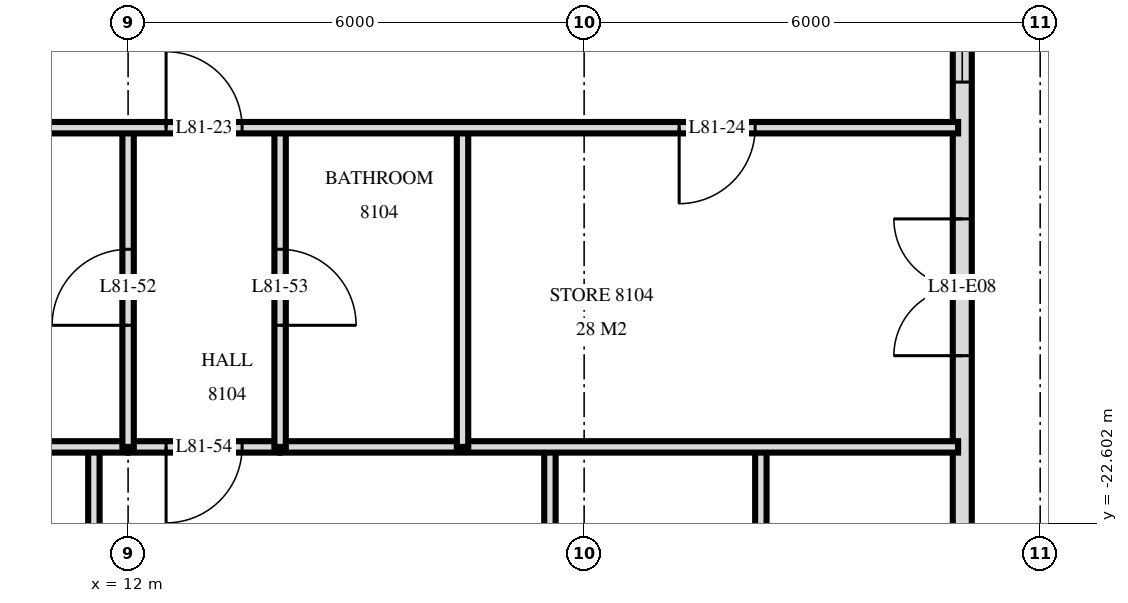
"""IFC4 building model, lengths in metres.
Left out: names, types, materials, properties, quantities, classifications, styles, units other than length and angle.
Written with IfcOpenShell. Run it as: python <this file> out.ifc"""

import sys

from ifc_helpers import new_model, si_unit, direction, frame, frame_2d, origin, place, context, subcontext, project, spatial, rectangle, extrude, element, fill, save


model = new_model("IFC4")
c1 = context("Model", 3, precision=1e-05, world=origin(), true_north=direction((0.0, 1.0)))
c2 = subcontext(c1, "Body", "Model", "MODEL_VIEW")
j1 = project(units=[si_unit("LENGTHUNIT", "METRE"), si_unit("PLANEANGLEUNIT", "RADIAN")], contexts=[c1])
p1 = place(None, origin())
s1 = spatial("IfcSite", under=j1, at=p1, CompositionType="ELEMENT")
p2 = place(p1, origin())
s2 = spatial("IfcBuilding", under=s1, at=p2, CompositionType="ELEMENT")
p3 = place(p2, frame((0.0, 0.0, 305.1)))
s3 = spatial("IfcBuildingStorey", under=s2, at=p3, CompositionType="ELEMENT", Elevation=305.1)
p4 = place(p3, frame((22.975, -29.275, 0.0), z_axis=(0.0, 0.0, 1.0), x_axis=(0.0, 1.0, 0.0)))
e1 = element("IfcWall", 1, at=p4, inside=s3, PredefinedType="SOLIDWALL", context=c2, shape_type="SweptSolid", body=[
    extrude(rectangle(XDim=25.951, YDim=0.25, at=frame_2d((12.975, 0.0))), origin(), (0.0, 0.0, 1.0), 3.2),
])
p5 = place(p4, frame((0.575, 0.0, 0.0)))
e2 = element("IfcOpeningElement", 2, at=p5, cuts=e1, PredefinedType="OPENING", context=c2, shape_type="SweptSolid", body=[
    extrude(rectangle(XDim=1.8, YDim=2.4, at=frame_2d((0.9, 1.2))), frame((0.0, 0.135, 0.0), z_axis=(0.0, -1.0, 0.0), x_axis=(1.0, 0.0, 0.0)), (0.0, 0.0, 1.0), 0.27),
])
p6 = place(p4, frame((3.325, 0.0, 0.9)))
e3 = element("IfcOpeningElement", 3, at=p6, cuts=e1, PredefinedType="OPENING", context=c2, shape_type="SweptSolid", body=[
    extrude(rectangle(XDim=1.8, YDim=1.5, at=frame_2d((0.9, 0.75))), frame((0.0, 0.135, 0.0), z_axis=(0.0, -1.0, 0.0), x_axis=(1.0, 0.0, 0.0)), (0.0, 0.0, 1.0), 0.27),
])
p7 = place(p4, frame((8.875, 0.0, 0.0)))
e4 = element("IfcOpeningElement", 4, at=p7, cuts=e1, PredefinedType="OPENING", context=c2, shape_type="SweptSolid", body=[
    extrude(rectangle(XDim=1.8, YDim=2.4, at=frame_2d((0.9, 1.2))), frame((0.0, 0.135, 0.0), z_axis=(0.0, -1.0, 0.0), x_axis=(1.0, 0.0, 0.0)), (0.0, 0.0, 1.0), 0.27),
])
p8 = place(p4, frame((12.475, 0.0, 0.9)))
e5 = element("IfcOpeningElement", 5, at=p8, cuts=e1, PredefinedType="OPENING", context=c2, shape_type="SweptSolid", body=[
    extrude(rectangle(XDim=1.2, YDim=1.5, at=frame_2d((0.6, 0.75))), frame((0.0, 0.135, 0.0), z_axis=(0.0, -1.0, 0.0), x_axis=(1.0, 0.0, 0.0)), (0.0, 0.0, 1.0), 0.27),
])
p9 = place(p4, frame((16.175, 0.0, 0.0)))
e6 = element("IfcOpeningElement", 6, at=p9, cuts=e1, PredefinedType="OPENING", context=c2, shape_type="SweptSolid", body=[
    extrude(rectangle(XDim=1.8, YDim=2.4, at=frame_2d((0.9, 1.2))), frame((0.0, 0.135, 0.0), z_axis=(0.0, -1.0, 0.0), x_axis=(1.0, 0.0, 0.0)), (0.0, 0.0, 1.0), 0.27),
])
p10 = place(p4, frame((22.425, 0.0, 0.0)))
e7 = element("IfcOpeningElement", 7, at=p10, cuts=e1, PredefinedType="OPENING", context=c2, shape_type="SweptSolid", body=[
    extrude(rectangle(XDim=1.8, YDim=2.4, at=frame_2d((0.9, 1.2))), frame((0.0, 0.135, 0.0), z_axis=(0.0, -1.0, 0.0), x_axis=(1.0, 0.0, 0.0)), (0.0, 0.0, 1.0), 0.27),
])
p11 = place(p3, frame((20.325, -33.239, 0.0), z_axis=(0.0, 0.0, 1.0), x_axis=(0.0, 1.0, 0.0)))
e8 = element("IfcWall", 8, at=p11, inside=s3, PredefinedType="PARTITIONING", context=c2, shape_type="SweptSolid", body=[
    extrude(rectangle(XDim=11.639, YDim=0.15, at=frame_2d((5.819, 0.0))), origin(), (0.0, 0.0, 1.0), 3.22),
])
p12 = place(p11, frame((5.269, 0.0, 0.0)))
e9 = element("IfcOpeningElement", 9, at=p12, cuts=e8, PredefinedType="OPENING", context=c2, shape_type="SweptSolid", body=[
    extrude(rectangle(XDim=0.9, YDim=2.1, at=frame_2d((0.45, 1.05))), frame((0.0, 0.085, 0.0), z_axis=(0.0, -1.0, 0.0), x_axis=(1.0, 0.0, 0.0)), (0.0, 0.0, 1.0), 0.17),
])
p13 = place(p3, frame((17.55, -33.62, 0.0), z_axis=(0.0, 0.0, 1.0), x_axis=(0.0, 1.0, 0.0)))
e10 = element("IfcWall", 10, at=p13, inside=s3, PredefinedType="PARTITIONING", context=c2, shape_type="SweptSolid", body=[
    extrude(rectangle(XDim=12.02, YDim=0.15, at=frame_2d((6.01, 0.0))), origin(), (0.0, 0.0, 1.0), 3.22),
])
p14 = place(p13, frame((5.45, 0.0, 0.0)))
e11 = element("IfcOpeningElement", 11, at=p14, cuts=e10, PredefinedType="OPENING", context=c2, shape_type="SweptSolid", body=[
    extrude(rectangle(XDim=0.9, YDim=2.1, at=frame_2d((0.45, 1.05))), frame((0.0, 0.085, 0.0), z_axis=(0.0, -1.0, 0.0), x_axis=(1.0, 0.0, 0.0)), (0.0, 0.0, 1.0), 0.17),
])
p15 = place(p3, frame((16.4, -21.6, 0.0), z_axis=(0.0, 0.0, 1.0), x_axis=(0.0, 1.0, 0.0)))
e12 = element("IfcWall", 12, at=p15, inside=s3, PredefinedType="PARTITIONING", context=c2, shape_type="SweptSolid", body=[
    extrude(rectangle(XDim=4.2, YDim=0.15, at=frame_2d((2.1, 0.0))), origin(), (0.0, 0.0, 1.0), 3.22),
])
p16 = place(p3, frame((14.0, -21.6, 0.0), z_axis=(0.0, 0.0, 1.0), x_axis=(0.0, 1.0, 0.0)))
e13 = element("IfcWall", 13, at=p16, inside=s3, PredefinedType="PARTITIONING", context=c2, shape_type="SweptSolid", body=[
    extrude(rectangle(XDim=4.2, YDim=0.15, at=frame_2d((2.1, 0.0))), origin(), (0.0, 0.0, 1.0), 3.22),
])
p17 = place(p16, frame((1.6, 0.0, 0.0)))
e14 = element("IfcOpeningElement", 14, at=p17, cuts=e13, PredefinedType="OPENING", context=c2, shape_type="SweptSolid", body=[
    extrude(rectangle(XDim=1.0, YDim=2.1, at=frame_2d((0.5, 1.05))), frame((0.0, 0.085, 0.0), z_axis=(0.0, -1.0, 0.0), x_axis=(1.0, 0.0, 0.0)), (0.0, 0.0, 1.0), 0.17),
])
p18 = place(p3, frame((12.0, -21.6, 0.0), z_axis=(0.0, 0.0, 1.0), x_axis=(0.0, 1.0, 0.0)))
e15 = element("IfcWall", 15, at=p18, inside=s3, PredefinedType="PARTITIONING", context=c2, shape_type="SweptSolid", body=[
    extrude(rectangle(XDim=4.2, YDim=0.15, at=frame_2d((2.1, 0.0))), origin(), (0.0, 0.0, 1.0), 3.22),
])
p19 = place(p18, frame((1.6, 0.0, 0.0)))
e16 = element("IfcOpeningElement", 16, at=p19, cuts=e15, PredefinedType="OPENING", context=c2, shape_type="SweptSolid", body=[
    extrude(rectangle(XDim=1.0, YDim=2.1, at=frame_2d((0.5, 1.05))), frame((0.0, 0.085, 0.0), z_axis=(0.0, -1.0, 0.0), x_axis=(1.0, 0.0, 0.0)), (0.0, 0.0, 1.0), 0.17),
])
p20 = place(p3, frame((11.55, -33.62, 0.0), z_axis=(0.0, 0.0, 1.0), x_axis=(0.0, 1.0, 0.0)))
e17 = element("IfcWall", 17, at=p20, inside=s3, PredefinedType="PARTITIONING", context=c2, shape_type="SweptSolid", body=[
    extrude(rectangle(XDim=12.02, YDim=0.15, at=frame_2d((6.01, 0.0))), origin(), (0.0, 0.0, 1.0), 3.22),
])
p21 = place(p20, frame((5.49, 0.0, 0.0)))
e18 = element("IfcOpeningElement", 18, at=p21, cuts=e17, PredefinedType="OPENING", context=c2, shape_type="SweptSolid", body=[
    extrude(rectangle(XDim=0.9, YDim=2.1, at=frame_2d((0.45, 1.05))), frame((0.0, 0.085, 0.0), z_axis=(0.0, -1.0, 0.0), x_axis=(1.0, 0.0, 0.0)), (0.0, 0.0, 1.0), 0.17),
])
p22 = place(p3, frame((12.0, -21.6, 0.0), z_axis=(0.0, 0.0, 1.0), x_axis=(1.0, 0.0, 0.0)))
e19 = element("IfcWall", 19, at=p22, inside=s3, PredefinedType="PARTITIONING", context=c2, shape_type="SweptSolid", body=[
    extrude(rectangle(XDim=2.0, YDim=0.15, at=frame_2d((1.0, 0.0))), origin(), (0.0, 0.0, 1.0), 3.22),
])
p23 = place(p22, frame((0.5, 0.0, 0.0)))
e20 = element("IfcOpeningElement", 20, at=p23, cuts=e19, PredefinedType="OPENING", context=c2, shape_type="SweptSolid", body=[
    extrude(rectangle(XDim=1.0, YDim=2.1, at=frame_2d((0.5, 1.05))), frame((0.0, 0.085, 0.0), z_axis=(0.0, -1.0, 0.0), x_axis=(1.0, 0.0, 0.0)), (0.0, 0.0, 1.0), 0.17),
])
p24 = place(p3, frame((6.0, -21.6, 0.0), z_axis=(0.0, 0.0, 1.0), x_axis=(1.0, 0.0, 0.0)))
e21 = element("IfcWall", 21, at=p24, inside=s3, PredefinedType="PARTITIONING", context=c2, shape_type="SweptSolid", body=[
    extrude(rectangle(XDim=6.0, YDim=0.15, at=frame_2d((3.0, 0.0))), origin(), (0.0, 0.0, 1.0), 3.22),
])
p25 = place(p24, frame((0.8, 0.0, 0.0)))
e22 = element("IfcOpeningElement", 22, at=p25, cuts=e21, PredefinedType="OPENING", context=c2, shape_type="SweptSolid", body=[
    extrude(rectangle(XDim=0.8, YDim=2.1, at=frame_2d((0.4, 1.05))), frame((0.0, 0.085, 0.0), z_axis=(0.0, -1.0, 0.0), x_axis=(1.0, 0.0, 0.0)), (0.0, 0.0, 1.0), 0.17),
])
p26 = place(p3, frame((14.0, -21.6, 0.0), z_axis=(0.0, 0.0, 1.0), x_axis=(1.0, 0.0, 0.0)))
e23 = element("IfcWall", 23, at=p26, inside=s3, PredefinedType="PARTITIONING", context=c2, shape_type="SweptSolid", body=[
    extrude(rectangle(XDim=8.92, YDim=0.15, at=frame_2d((4.46, 0.0))), origin(), (0.0, 0.0, 1.0), 3.22),
])
p27 = place(p3, frame((-22.92, -17.4, 0.0), z_axis=(0.0, 0.0, 1.0), x_axis=(1.0, 0.0, 0.0)))
e24 = element("IfcWall", 24, at=p27, inside=s3, PredefinedType="PARTITIONING", context=c2, shape_type="SweptSolid", body=[
    extrude(rectangle(XDim=45.84, YDim=0.15, at=frame_2d((22.92, 0.0))), origin(), (0.0, 0.0, 1.0), 3.22),
])
p28 = place(p27, frame((18.67, 0.0, 0.0)))
e25 = element("IfcOpeningElement", 25, at=p28, cuts=e24, PredefinedType="OPENING", context=c2, shape_type="SweptSolid", body=[
    extrude(rectangle(XDim=1.0, YDim=2.1, at=frame_2d((0.5, 1.05))), frame((0.0, 0.085, 0.0), z_axis=(0.0, -1.0, 0.0), x_axis=(1.0, 0.0, 0.0)), (0.0, 0.0, 1.0), 0.17),
])
p29 = place(p27, frame((20.32, 0.0, 0.0)))
e26 = element("IfcOpeningElement", 26, at=p29, cuts=e24, PredefinedType="OPENING", context=c2, shape_type="SweptSolid", body=[
    extrude(rectangle(XDim=1.0, YDim=2.1, at=frame_2d((0.5, 1.05))), frame((0.0, 0.085, 0.0), z_axis=(0.0, -1.0, 0.0), x_axis=(1.0, 0.0, 0.0)), (0.0, 0.0, 1.0), 0.17),
])
p30 = place(p27, frame((27.52, 0.0, 0.0)))
e27 = element("IfcOpeningElement", 27, at=p30, cuts=e24, PredefinedType="OPENING", context=c2, shape_type="SweptSolid", body=[
    extrude(rectangle(XDim=1.0, YDim=2.1, at=frame_2d((0.5, 1.05))), frame((0.0, 0.085, 0.0), z_axis=(0.0, -1.0, 0.0), x_axis=(1.0, 0.0, 0.0)), (0.0, 0.0, 1.0), 0.17),
])
p31 = place(p27, frame((6.42, 0.0, 0.0)))
e28 = element("IfcOpeningElement", 28, at=p31, cuts=e24, PredefinedType="OPENING", context=c2, shape_type="SweptSolid", body=[
    extrude(rectangle(XDim=1.0, YDim=2.1, at=frame_2d((0.5, 1.05))), frame((0.0, 0.085, 0.0), z_axis=(0.0, -1.0, 0.0), x_axis=(1.0, 0.0, 0.0)), (0.0, 0.0, 1.0), 0.17),
])
p32 = place(p27, frame((1.17, 0.0, 0.0)))
e29 = element("IfcOpeningElement", 29, at=p32, cuts=e24, PredefinedType="OPENING", context=c2, shape_type="SweptSolid", body=[
    extrude(rectangle(XDim=1.0, YDim=2.1, at=frame_2d((0.5, 1.05))), frame((0.0, 0.085, 0.0), z_axis=(0.0, -1.0, 0.0), x_axis=(1.0, 0.0, 0.0)), (0.0, 0.0, 1.0), 0.17),
])
p33 = place(p27, frame((35.42, 0.0, 0.0)))
e30 = element("IfcOpeningElement", 30, at=p33, cuts=e24, PredefinedType="OPENING", context=c2, shape_type="SweptSolid", body=[
    extrude(rectangle(XDim=1.0, YDim=2.1, at=frame_2d((0.5, 1.05))), frame((0.0, 0.085, 0.0), z_axis=(0.0, -1.0, 0.0), x_axis=(1.0, 0.0, 0.0)), (0.0, 0.0, 1.0), 0.17),
])
p34 = place(p27, frame((42.17, 0.0, 0.0)))
e31 = element("IfcOpeningElement", 31, at=p34, cuts=e24, PredefinedType="OPENING", context=c2, shape_type="SweptSolid", body=[
    extrude(rectangle(XDim=1.0, YDim=2.1, at=frame_2d((0.5, 1.05))), frame((0.0, 0.085, 0.0), z_axis=(0.0, -1.0, 0.0), x_axis=(1.0, 0.0, 0.0)), (0.0, 0.0, 1.0), 0.17),
])
p35 = place(p7, origin())
e32 = element("IfcDoor", 32, at=p35, inside=s3, OperationType="DOUBLE_DOOR_SINGLE_SWING", PredefinedType="DOOR", context=c2, shape_type="SweptSolid", body=[
    extrude(rectangle(XDim=1.8, YDim=2.4, at=frame_2d((0.9, 1.2))), frame((0.0, 0.025, 0.0), z_axis=(0.0, -1.0, 0.0), x_axis=(1.0, 0.0, 0.0)), (0.0, 0.0, 1.0), 0.05),
])
fill(e4, e32)
p36 = place(p8, origin())
e33 = element("IfcWindow", 33, at=p36, inside=s3, PartitioningType="SINGLE_PANEL", PredefinedType="WINDOW", context=c2, shape_type="SweptSolid", body=[
    extrude(rectangle(XDim=1.2, YDim=1.5, at=frame_2d((0.6, 0.75))), frame((0.0, 0.03, 0.0), z_axis=(0.0, -1.0, 0.0), x_axis=(1.0, 0.0, 0.0)), (0.0, 0.0, 1.0), 0.06),
])
fill(e5, e33)
p37 = place(p33, origin())
e34 = element("IfcDoor", 34, at=p37, inside=s3, OperationType="SINGLE_SWING_RIGHT", PredefinedType="DOOR", context=c2, shape_type="SweptSolid", body=[
    extrude(rectangle(XDim=1.0, YDim=2.1, at=frame_2d((0.5, 1.05))), frame((0.0, 0.025, 0.0), z_axis=(0.0, -1.0, 0.0), x_axis=(1.0, 0.0, 0.0)), (0.0, 0.0, 1.0), 0.05),
])
fill(e30, e34)
p38 = place(p34, frame((0.5, 0.0, 0.0), z_axis=(0.0, 0.0, 1.0), x_axis=(-1.0, 0.0, 0.0)))
e35 = element("IfcDoor", 35, at=p38, inside=s3, OperationType="SINGLE_SWING_LEFT", PredefinedType="DOOR", context=c2, shape_type="SweptSolid", body=[
    extrude(rectangle(XDim=1.0, YDim=2.1, at=frame_2d((0.0, 1.05))), frame((0.0, -0.025, 0.0), z_axis=(0.0, 1.0, 0.0), x_axis=(-1.0, 0.0, 0.0)), (0.0, 0.0, 1.0), 0.05),
])
fill(e31, e35)
p39 = place(p19, origin())
e36 = element("IfcDoor", 36, at=p39, inside=s3, OperationType="SINGLE_SWING_RIGHT", PredefinedType="DOOR", context=c2, shape_type="SweptSolid", body=[
    extrude(rectangle(XDim=1.0, YDim=2.1, at=frame_2d((0.5, 1.05))), frame((0.0, 0.025, 0.0), z_axis=(0.0, -1.0, 0.0), x_axis=(1.0, 0.0, 0.0)), (0.0, 0.0, 1.0), 0.05),
])
fill(e16, e36)
p40 = place(p17, frame((0.5, 0.0, 0.0), z_axis=(0.0, 0.0, 1.0), x_axis=(-1.0, 0.0, 0.0)))
e37 = element("IfcDoor", 37, at=p40, inside=s3, OperationType="SINGLE_SWING_LEFT", PredefinedType="DOOR", context=c2, shape_type="SweptSolid", body=[
    extrude(rectangle(XDim=1.0, YDim=2.1, at=frame_2d((0.0, 1.05))), frame((0.0, -0.025, 0.0), z_axis=(0.0, 1.0, 0.0), x_axis=(-1.0, 0.0, 0.0)), (0.0, 0.0, 1.0), 0.05),
])
fill(e14, e37)
p41 = place(p23, frame((0.5, 0.0, 0.0), z_axis=(0.0, 0.0, 1.0), x_axis=(-1.0, 0.0, 0.0)))
e38 = element("IfcDoor", 38, at=p41, inside=s3, OperationType="SINGLE_SWING_LEFT", PredefinedType="DOOR", context=c2, shape_type="SweptSolid", body=[
    extrude(rectangle(XDim=1.0, YDim=2.1, at=frame_2d((0.0, 1.05))), frame((0.0, -0.025, 0.0), z_axis=(0.0, 1.0, 0.0), x_axis=(-1.0, 0.0, 0.0)), (0.0, 0.0, 1.0), 0.05),
])
fill(e20, e38)
save(model, sys.argv[1])
